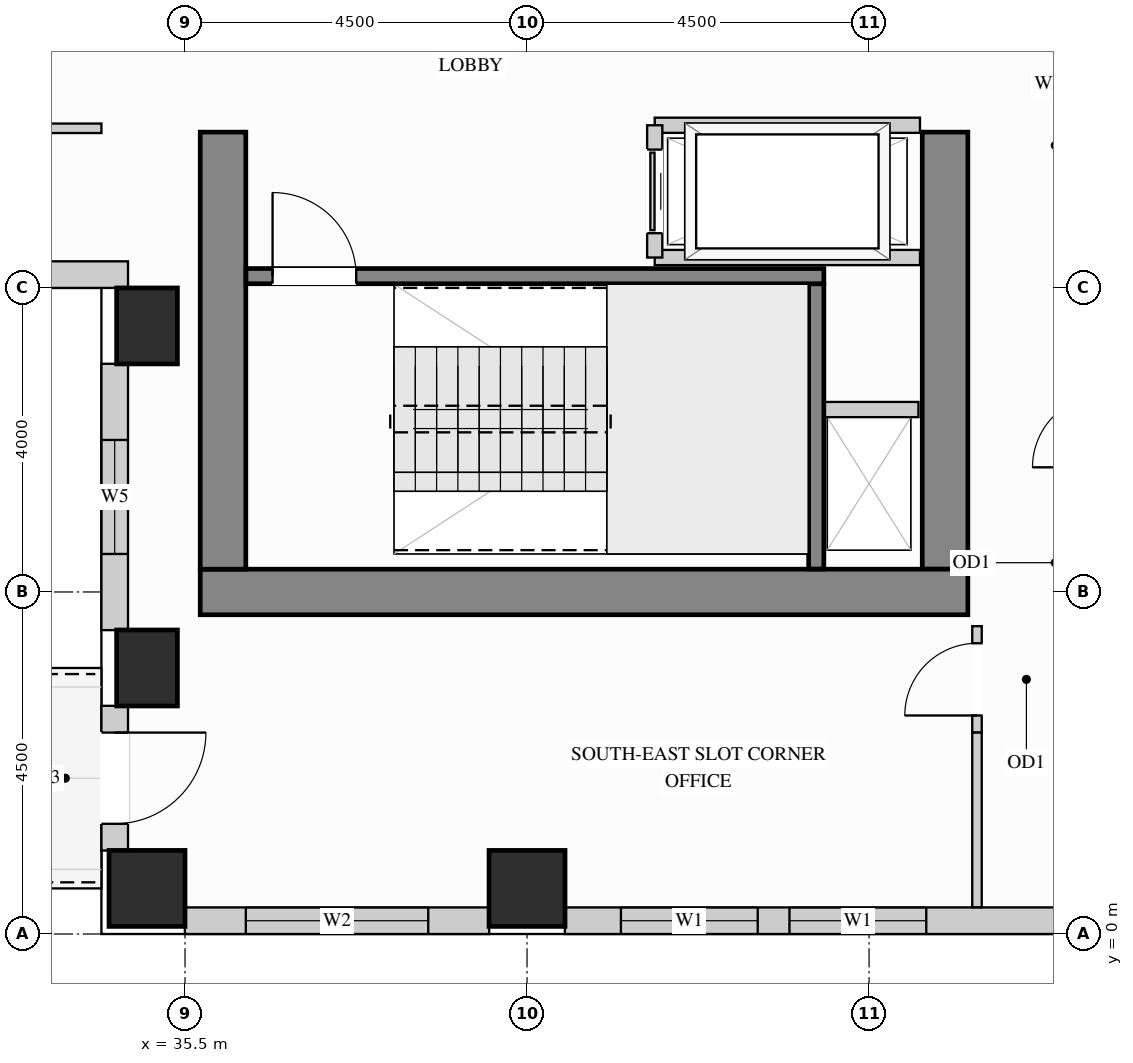
"""IFC4 building model, lengths in metres.
Left out: names, types, materials, properties, quantities, classifications, styles, units other than length and angle.
Written with IfcOpenShell. Run it as: python <this file> out.ifc"""

import sys

from ifc_helpers import new_model, si_unit, direction, frame, frame_2d, origin, origin_2d, place, context, subcontext, project, spatial, rectangle, extrude, source, transform, mapped, element, fill, save


model = new_model("IFC4")
c1 = context("Model", 3, precision=1e-05, world=origin(), true_north=direction((0.0, 1.0)))
c2 = subcontext(c1, "Body", "Model", "MODEL_VIEW")
j1 = project(units=[si_unit("LENGTHUNIT", "METRE"), si_unit("PLANEANGLEUNIT", "RADIAN")], contexts=[c1])
p1 = place(None, origin())
s1 = spatial("IfcSite", under=j1, at=p1, CompositionType="ELEMENT")
p2 = place(p1, origin())
s2 = spatial("IfcBuilding", under=s1, at=p2, CompositionType="ELEMENT")
p3 = place(p2, frame((0.0, 0.0, 179.1)))
s3 = spatial("IfcBuildingStorey", under=s2, at=p3, CompositionType="ELEMENT", Elevation=179.1)
m1 = source(origin(), c2, "Body", "SweptSolid", [
    extrude(rectangle(XDim=0.8, YDim=1.0, at=origin_2d()), origin(), (0.0, 0.0, 1.0), 3.4),
])
for number, where, z_axis, x_axis in (
    (1, (35.0, 3.5, 0.0), (0.0, 0.0, 1.0), (1.0, 0.0, 0.0)),
    (2, (35.0, 8.0, 0.0), (0.0, 0.0, 1.0), (1.0, 0.0, 0.0)),
):
    element("IfcColumn", number, at=place(p3, frame(where, z_axis=z_axis, x_axis=x_axis)), inside=s3, PredefinedType="COLUMN", context=c2, shape_type="MappedRepresentation", body=[
        mapped(m1, transform((0.0, 0.0, 0.0), x_axis=(1.0, 0.0, 0.0), y_axis=(0.0, 1.0, 0.0), z_axis=(0.0, 0.0, 1.0))),
    ])
m2 = source(origin(), c2, "Body", "SweptSolid", [
    extrude(rectangle(XDim=1.0, YDim=1.0, at=origin_2d()), origin(), (0.0, 0.0, 1.0), 3.4),
])
for number, where, z_axis, x_axis in (
    (3, (35.0, 0.6, 0.0), (0.0, 0.0, 1.0), (1.0, 0.0, 0.0)),
    (4, (40.0, 0.6, 0.0), (0.0, 0.0, 1.0), (1.0, 0.0, 0.0)),
):
    element("IfcColumn", number, at=place(p3, frame(where, z_axis=z_axis, x_axis=x_axis)), inside=s3, PredefinedType="COLUMN", context=c2, shape_type="MappedRepresentation", body=[
        mapped(m2, transform((0.0, 0.0, 0.0), x_axis=(1.0, 0.0, 0.0), y_axis=(0.0, 1.0, 0.0), z_axis=(0.0, 0.0, 1.0))),
    ])
m3 = source(origin(), c2, "Body", "SweptSolid", [
    extrude(rectangle(XDim=5.75, YDim=0.6, at=frame_2d((2.875, 0.0))), origin(), (0.0, 0.0, 1.0), 3.4),
])
p4 = place(p3, frame((45.5, 4.8, 0.0), z_axis=(0.0, 0.0, 1.0), x_axis=(0.0, 1.0, 0.0)))
e5 = element("IfcWall", 5, at=p4, inside=s3, PredefinedType="SHEAR", context=c2, shape_type="MappedRepresentation", body=[
    mapped(m3, transform((0.0, 0.0, 0.0), x_axis=(1.0, 0.0, 0.0), y_axis=(0.0, 1.0, 0.0), z_axis=(0.0, 0.0, 1.0))),
])
m4 = source(origin(), c2, "Body", "SweptSolid", [
    extrude(rectangle(XDim=10.1, YDim=0.6, at=frame_2d((5.05, 0.0))), origin(), (0.0, 0.0, 1.0), 3.4),
])
p5 = place(p3, frame((35.7, 4.5, 0.0), z_axis=(0.0, 0.0, 1.0), x_axis=(1.0, 0.0, 0.0)))
e6 = element("IfcWall", 6, at=p5, inside=s3, PredefinedType="SHEAR", context=c2, shape_type="MappedRepresentation", body=[
    mapped(m4, transform((0.0, 0.0, 0.0), x_axis=(1.0, 0.0, 0.0), y_axis=(0.0, 1.0, 0.0), z_axis=(0.0, 0.0, 1.0))),
])
p6 = place(p3, frame((36.0, 4.8, 0.0), z_axis=(0.0, 0.0, 1.0), x_axis=(0.0, 1.0, 0.0)))
e7 = element("IfcWall", 7, at=p6, inside=s3, PredefinedType="SHEAR", context=c2, shape_type="MappedRepresentation", body=[
    mapped(m3, transform((0.0, 0.0, 0.0), x_axis=(1.0, 0.0, 0.0), y_axis=(0.0, 1.0, 0.0), z_axis=(0.0, 0.0, 1.0))),
])
p7 = place(p3, frame((30.898, 8.675, 0.0), z_axis=(0.0, 0.0, 1.0), x_axis=(1.0, 0.0, 0.0)))
e8 = element("IfcWall", 8, at=p7, inside=s3, PredefinedType="SOLIDWALL", context=c2, shape_type="SweptSolid", body=[
    extrude(rectangle(XDim=3.852, YDim=0.35, at=frame_2d((1.926, 0.0))), origin(), (0.0, 0.0, 1.0), 3.385),
])
p8 = place(p7, frame((1.176, 0.0, 0.78)))
e9 = element("IfcOpeningElement", 9, at=p8, cuts=e8, PredefinedType="OPENING", context=c2, shape_type="SweptSolid", body=[
    extrude(rectangle(XDim=1.5, YDim=2.0, at=frame_2d((0.75, 1.0))), frame((0.0, 0.185, 0.0), z_axis=(0.0, -1.0, 0.0), x_axis=(1.0, 0.0, 0.0)), (0.0, 0.0, 1.0), 0.37),
])
p9 = place(p3, frame((34.575, 7.502, 0.0), z_axis=(0.0, 0.0, 1.0), x_axis=(0.0, -1.0, 0.0)))
e10 = element("IfcWall", 10, at=p9, inside=s3, PredefinedType="SOLIDWALL", context=c2, shape_type="SweptSolid", body=[
    extrude(rectangle(XDim=3.504, YDim=0.35, at=frame_2d((1.752, 0.0))), origin(), (0.0, 0.0, 1.0), 2.612),
])
p10 = place(p9, frame((1.002, 0.0, 0.78)))
e11 = element("IfcOpeningElement", 11, at=p10, cuts=e10, PredefinedType="OPENING", context=c2, shape_type="SweptSolid", body=[
    extrude(rectangle(XDim=1.5, YDim=1.652, at=frame_2d((0.75, 0.826))), frame((0.0, 0.185, 0.0), z_axis=(0.0, -1.0, 0.0), x_axis=(1.0, 0.0, 0.0)), (0.0, 0.0, 1.0), 0.37),
])
p11 = place(p3, frame((34.575, 3.002, 0.0), z_axis=(0.0, 0.0, 1.0), x_axis=(0.0, -1.0, 0.0)))
e12 = element("IfcWall", 12, at=p11, inside=s3, PredefinedType="SOLIDWALL", context=c2, shape_type="SweptSolid", body=[
    extrude(rectangle(XDim=1.904, YDim=0.35, at=frame_2d((0.952, 0.0))), origin(), (0.0, 0.0, 1.0), 2.612),
])
p12 = place(p11, frame((0.352, 0.0, 0.0)))
e13 = element("IfcOpeningElement", 13, at=p12, cuts=e12, PredefinedType="OPENING", context=c2, shape_type="SweptSolid", body=[
    extrude(rectangle(XDim=1.2, YDim=2.15, at=frame_2d((0.6, 1.075))), frame((0.0, 0.185, 0.0), z_axis=(0.0, -1.0, 0.0), x_axis=(1.0, 0.0, 0.0)), (0.0, 0.0, 1.0), 0.37),
])
p13 = place(p3, frame((35.498, 0.175, 0.0), z_axis=(0.0, 0.0, 1.0), x_axis=(1.0, 0.0, 0.0)))
e14 = element("IfcWall", 14, at=p13, inside=s3, PredefinedType="SOLIDWALL", context=c2, shape_type="SweptSolid", body=[
    extrude(rectangle(XDim=4.004, YDim=0.35, at=frame_2d((2.002, 0.0))), origin(), (0.0, 0.0, 1.0), 2.612),
])
p14 = place(p13, frame((0.802, 0.0, 0.78)))
e15 = element("IfcOpeningElement", 15, at=p14, cuts=e14, PredefinedType="OPENING", context=c2, shape_type="SweptSolid", body=[
    extrude(rectangle(XDim=2.4, YDim=1.652, at=frame_2d((1.2, 0.826))), frame((0.0, 0.185, 0.0), z_axis=(0.0, -1.0, 0.0), x_axis=(1.0, 0.0, 0.0)), (0.0, 0.0, 1.0), 0.37),
])
p15 = place(p3, frame((40.498, 0.175, 0.0), z_axis=(0.0, 0.0, 1.0), x_axis=(1.0, 0.0, 0.0)))
e16 = element("IfcWall", 16, at=p15, inside=s3, PredefinedType="SOLIDWALL", context=c2, shape_type="SweptSolid", body=[
    extrude(rectangle(XDim=6.604, YDim=0.35, at=frame_2d((3.302, 0.0))), origin(), (0.0, 0.0, 1.0), 2.612),
])
p16 = place(p15, frame((0.737, 0.0, 0.78)))
e17 = element("IfcOpeningElement", 17, at=p16, cuts=e16, PredefinedType="OPENING", context=c2, shape_type="SweptSolid", body=[
    extrude(rectangle(XDim=1.8, YDim=1.652, at=frame_2d((0.9, 0.826))), frame((0.0, 0.185, 0.0), z_axis=(0.0, -1.0, 0.0), x_axis=(1.0, 0.0, 0.0)), (0.0, 0.0, 1.0), 0.37),
])
p17 = place(p15, frame((2.955, 0.0, 0.78)))
e18 = element("IfcOpeningElement", 18, at=p17, cuts=e16, PredefinedType="OPENING", context=c2, shape_type="SweptSolid", body=[
    extrude(rectangle(XDim=1.8, YDim=1.652, at=frame_2d((0.9, 0.826))), frame((0.0, 0.185, 0.0), z_axis=(0.0, -1.0, 0.0), x_axis=(1.0, 0.0, 0.0)), (0.0, 0.0, 1.0), 0.37),
])
p18 = place(p3, frame((45.92, 2.65, 0.0), z_axis=(0.0, 0.0, 1.0), x_axis=(0.0, 1.0, 0.0)))
e19 = element("IfcWall", 19, at=p18, inside=s3, PredefinedType="PARTITIONING", context=c2, shape_type="SweptSolid", body=[
    extrude(rectangle(XDim=1.4, YDim=0.125, at=frame_2d((0.7, 0.0))), origin(), (0.0, 0.0, 1.0), 3.385),
])
p19 = place(p18, frame((0.225, 0.0, 0.0)))
e20 = element("IfcOpeningElement", 20, at=p19, cuts=e19, PredefinedType="OPENING", context=c2, shape_type="SweptSolid", body=[
    extrude(rectangle(XDim=0.95, YDim=2.15, at=frame_2d((0.475, 1.075))), frame((0.0, 0.073, 0.0), z_axis=(0.0, -1.0, 0.0), x_axis=(1.0, 0.0, 0.0)), (0.0, 0.0, 1.0), 0.145),
])
m5 = source(origin(), c2, "Body", "SweptSolid", [
    extrude(rectangle(XDim=2.298, YDim=0.125, at=frame_2d((1.149, 0.0))), origin(), (0.0, 0.0, 1.0), 3.385),
])
p20 = place(p3, frame((45.92, 0.352, 0.0), z_axis=(0.0, 0.0, 1.0), x_axis=(0.0, 1.0, 0.0)))
e21 = element("IfcWall", 21, at=p20, inside=s3, PredefinedType="PARTITIONING", context=c2, shape_type="MappedRepresentation", body=[
    mapped(m5, transform((0.0, 0.0, 0.0), x_axis=(1.0, 0.0, 0.0), y_axis=(0.0, 1.0, 0.0), z_axis=(0.0, 0.0, 1.0))),
])
p21 = place(p3, frame((19.5, 10.6, 0.0), z_axis=(0.0, 0.0, 1.0), x_axis=(1.0, 0.0, 0.0)))
e22 = element("IfcWall", 22, at=p21, inside=s3, PredefinedType="PARTITIONING", context=c2, shape_type="SweptSolid", body=[
    extrude(rectangle(XDim=14.9, YDim=0.125, at=frame_2d((7.45, 0.0))), origin(), (0.0, 0.0, 1.0), 3.385),
])
p22 = place(p21, frame((6.975, 0.0, 0.0)))
e23 = element("IfcOpeningElement", 23, at=p22, cuts=e22, PredefinedType="OPENING", context=c2, shape_type="SweptSolid", body=[
    extrude(rectangle(XDim=0.95, YDim=2.15, at=frame_2d((0.475, 1.075))), frame((0.0, 0.073, 0.0), z_axis=(0.0, -1.0, 0.0), x_axis=(1.0, 0.0, 0.0)), (0.0, 0.0, 1.0), 0.145),
])
m6 = source(origin(), c2, "Body", "SweptSolid", [
    extrude(rectangle(XDim=1.3, YDim=0.2, at=frame_2d((0.65, 0.0))), origin(), (0.0, 0.0, 1.0), 3.385),
])
p23 = place(p3, frame((43.85, 6.9, 0.0), z_axis=(0.0, 0.0, 1.0), x_axis=(1.0, 0.0, 0.0)))
e24 = element("IfcWall", 24, at=p23, inside=s3, PredefinedType="PARTITIONING", context=c2, shape_type="MappedRepresentation", body=[
    mapped(m6, transform((0.0, 0.0, 0.0), x_axis=(1.0, 0.0, 0.0), y_axis=(0.0, 1.0, 0.0), z_axis=(0.0, 0.0, 1.0))),
])
m7 = source(origin(), c2, "Body", "SweptSolid", [
    extrude(rectangle(XDim=3.49, YDim=0.2, at=frame_2d((1.745, 0.0))), origin(), (0.0, 0.0, 1.0), 3.385),
])
for number, where, z_axis, x_axis in (
    (25, (41.68, 10.64, 0.0), (0.0, 0.0, 1.0), (1.0, 0.0, 0.0)),
    (26, (41.68, 8.9, 0.0), (0.0, 0.0, 1.0), (1.0, 0.0, 0.0)),
):
    element("IfcWall", number, at=place(p3, frame(where, z_axis=z_axis, x_axis=x_axis)), inside=s3, PredefinedType="PARTITIONING", context=c2, shape_type="MappedRepresentation", body=[
        mapped(m7, transform((0.0, 0.0, 0.0), x_axis=(1.0, 0.0, 0.0), y_axis=(0.0, 1.0, 0.0), z_axis=(0.0, 0.0, 1.0))),
    ])
p24 = place(p3, frame((41.68, 8.9, 0.0), z_axis=(0.0, 0.0, 1.0), x_axis=(0.0, 1.0, 0.0)))
e27 = element("IfcWall", 27, at=p24, inside=s3, PredefinedType="PARTITIONING", context=c2, shape_type="SweptSolid", body=[
    extrude(rectangle(XDim=1.74, YDim=0.2, at=frame_2d((0.87, 0.0))), origin(), (0.0, 0.0, 1.0), 3.385),
])
p25 = place(p24, frame((0.32, 0.0, 0.0)))
e28 = element("IfcOpeningElement", 28, at=p25, cuts=e27, PredefinedType="OPENING", context=c2, shape_type="SweptSolid", body=[
    extrude(rectangle(XDim=1.1, YDim=2.2, at=frame_2d((0.55, 1.1))), frame((0.0, 0.11, 0.0), z_axis=(0.0, -1.0, 0.0), x_axis=(1.0, 0.0, 0.0)), (0.0, 0.0, 1.0), 0.22),
])
m8 = source(origin(), c2, "Body", "SweptSolid", [
    extrude(rectangle(XDim=3.753, YDim=0.2, at=frame_2d((1.876, 0.0))), origin(), (0.0, 0.0, 1.0), 3.4),
])
p26 = place(p3, frame((43.805, 4.802, 0.0), z_axis=(0.0, 0.0, 1.0), x_axis=(0.0, 1.0, 0.0)))
e29 = element("IfcWall", 29, at=p26, inside=s3, PredefinedType="SHEAR", context=c2, shape_type="MappedRepresentation", body=[
    mapped(m8, transform((0.0, 0.0, 0.0), x_axis=(1.0, 0.0, 0.0), y_axis=(0.0, 1.0, 0.0), z_axis=(0.0, 0.0, 1.0))),
])
p27 = place(p3, frame((36.302, 8.655, 0.0), z_axis=(0.0, 0.0, 1.0), x_axis=(1.0, 0.0, 0.0)))
e30 = element("IfcWall", 30, at=p27, inside=s3, PredefinedType="SHEAR", context=c2, shape_type="SweptSolid", body=[
    extrude(rectangle(XDim=7.603, YDim=0.2, at=frame_2d((3.802, 0.0))), origin(), (0.0, 0.0, 1.0), 3.4),
])
p28 = place(p27, frame((0.35, 0.0, 0.0)))
e31 = element("IfcOpeningElement", 31, at=p28, cuts=e30, PredefinedType="OPENING", context=c2, shape_type="SweptSolid", body=[
    extrude(rectangle(XDim=1.1, YDim=2.15, at=frame_2d((0.55, 1.075))), frame((0.0, 0.11, 0.0), z_axis=(0.0, -1.0, 0.0), x_axis=(1.0, 0.0, 0.0)), (0.0, 0.0, 1.0), 0.22),
])
m9 = source(origin(), c2, "Body", "SweptSolid", [
    extrude(rectangle(XDim=1.2, YDim=2.15, at=frame_2d((0.6, 1.075))), frame((0.0, 0.025, 0.0), z_axis=(0.0, -1.0, 0.0), x_axis=(1.0, 0.0, 0.0)), (0.0, 0.0, 1.0), 0.05),
])
p29 = place(p12, frame((1.2, 0.0, 0.0), z_axis=(0.0, 0.0, 1.0), x_axis=(-1.0, 0.0, 0.0)))
e32 = element("IfcDoor", 32, at=p29, inside=s3, OperationType="SINGLE_SWING_LEFT", PredefinedType="DOOR", context=c2, shape_type="MappedRepresentation", body=[
    mapped(m9, transform((0.0, 0.0, 0.0), x_axis=(1.0, 0.0, 0.0), y_axis=(0.0, 1.0, 0.0), z_axis=(0.0, 0.0, 1.0))),
])
fill(e13, e32)
m10 = source(origin(), c2, "Body", "SweptSolid", [
    extrude(rectangle(XDim=1.1, YDim=2.2, at=frame_2d((0.55, 1.1))), frame((0.0, 0.025, 0.0), z_axis=(0.0, -1.0, 0.0), x_axis=(1.0, 0.0, 0.0)), (0.0, 0.0, 1.0), 0.05),
])
p30 = place(p25, origin())
e33 = element("IfcDoor", 33, at=p30, inside=s3, OperationType="SLIDING_TO_LEFT", PredefinedType="DOOR", context=c2, shape_type="MappedRepresentation", body=[
    mapped(m10, transform((0.0, 0.0, 0.0), x_axis=(1.0, 0.0, 0.0), y_axis=(0.0, 1.0, 0.0), z_axis=(0.0, 0.0, 1.0))),
])
fill(e28, e33)
m11 = source(origin(), c2, "Body", "SweptSolid", [
    extrude(rectangle(XDim=0.95, YDim=2.15, at=frame_2d((0.475, 1.075))), frame((0.0, 0.025, 0.0), z_axis=(0.0, -1.0, 0.0), x_axis=(1.0, 0.0, 0.0)), (0.0, 0.0, 1.0), 0.05),
])
p31 = place(p19, origin())
e34 = element("IfcDoor", 34, at=p31, inside=s3, OperationType="SINGLE_SWING_LEFT", PredefinedType="DOOR", context=c2, shape_type="MappedRepresentation", body=[
    mapped(m11, transform((0.0, 0.0, 0.0), x_axis=(1.0, 0.0, 0.0), y_axis=(0.0, 1.0, 0.0), z_axis=(0.0, 0.0, 1.0))),
])
fill(e20, e34)
m12 = source(origin(), c2, "Body", "SweptSolid", [
    extrude(rectangle(XDim=1.1, YDim=2.15, at=frame_2d((0.55, 1.075))), frame((0.0, 0.025, 0.0), z_axis=(0.0, -1.0, 0.0), x_axis=(1.0, 0.0, 0.0)), (0.0, 0.0, 1.0), 0.05),
])
p32 = place(p28, origin())
e35 = element("IfcDoor", 35, at=p32, inside=s3, OperationType="SINGLE_SWING_LEFT", PredefinedType="DOOR", context=c2, shape_type="MappedRepresentation", body=[
    mapped(m12, transform((0.0, 0.0, 0.0), x_axis=(1.0, 0.0, 0.0), y_axis=(0.0, 1.0, 0.0), z_axis=(0.0, 0.0, 1.0))),
])
fill(e31, e35)
m13 = source(origin(), c2, "Body", "SweptSolid", [
    extrude(rectangle(XDim=1.8, YDim=1.652, at=frame_2d((0.9, 0.826))), frame((0.0, 0.03, 0.0), z_axis=(0.0, -1.0, 0.0), x_axis=(1.0, 0.0, 0.0)), (0.0, 0.0, 1.0), 0.06),
])
p33 = place(p16, origin())
e36 = element("IfcWindow", 36, at=p33, inside=s3, PartitioningType="SINGLE_PANEL", PredefinedType="WINDOW", context=c2, shape_type="MappedRepresentation", body=[
    mapped(m13, transform((0.0, 0.0, 0.0), x_axis=(1.0, 0.0, 0.0), y_axis=(0.0, 1.0, 0.0), z_axis=(0.0, 0.0, 1.0))),
])
fill(e17, e36)
p34 = place(p17, origin())
e37 = element("IfcWindow", 37, at=p34, inside=s3, PartitioningType="SINGLE_PANEL", PredefinedType="WINDOW", context=c2, shape_type="MappedRepresentation", body=[
    mapped(m13, transform((0.0, 0.0, 0.0), x_axis=(1.0, 0.0, 0.0), y_axis=(0.0, 1.0, 0.0), z_axis=(0.0, 0.0, 1.0))),
])
fill(e18, e37)
m14 = source(origin(), c2, "Body", "SweptSolid", [
    extrude(rectangle(XDim=2.4, YDim=1.652, at=frame_2d((1.2, 0.826))), frame((0.0, 0.03, 0.0), z_axis=(0.0, -1.0, 0.0), x_axis=(1.0, 0.0, 0.0)), (0.0, 0.0, 1.0), 0.06),
])
p35 = place(p14, origin())
e38 = element("IfcWindow", 38, at=p35, inside=s3, PartitioningType="SINGLE_PANEL", PredefinedType="WINDOW", context=c2, shape_type="MappedRepresentation", body=[
    mapped(m14, transform((0.0, 0.0, 0.0), x_axis=(1.0, 0.0, 0.0), y_axis=(0.0, 1.0, 0.0), z_axis=(0.0, 0.0, 1.0))),
])
fill(e15, e38)
m15 = source(origin(), c2, "Body", "SweptSolid", [
    extrude(rectangle(XDim=1.5, YDim=1.652, at=frame_2d((0.75, 0.826))), frame((0.0, 0.03, 0.0), z_axis=(0.0, -1.0, 0.0), x_axis=(1.0, 0.0, 0.0)), (0.0, 0.0, 1.0), 0.06),
])
p36 = place(p10, origin())
e39 = element("IfcWindow", 39, at=p36, inside=s3, PartitioningType="SINGLE_PANEL", PredefinedType="WINDOW", context=c2, shape_type="MappedRepresentation", body=[
    mapped(m15, transform((0.0, 0.0, 0.0), x_axis=(1.0, 0.0, 0.0), y_axis=(0.0, 1.0, 0.0), z_axis=(0.0, 0.0, 1.0))),
])
fill(e11, e39)
save(model, sys.argv[1])
